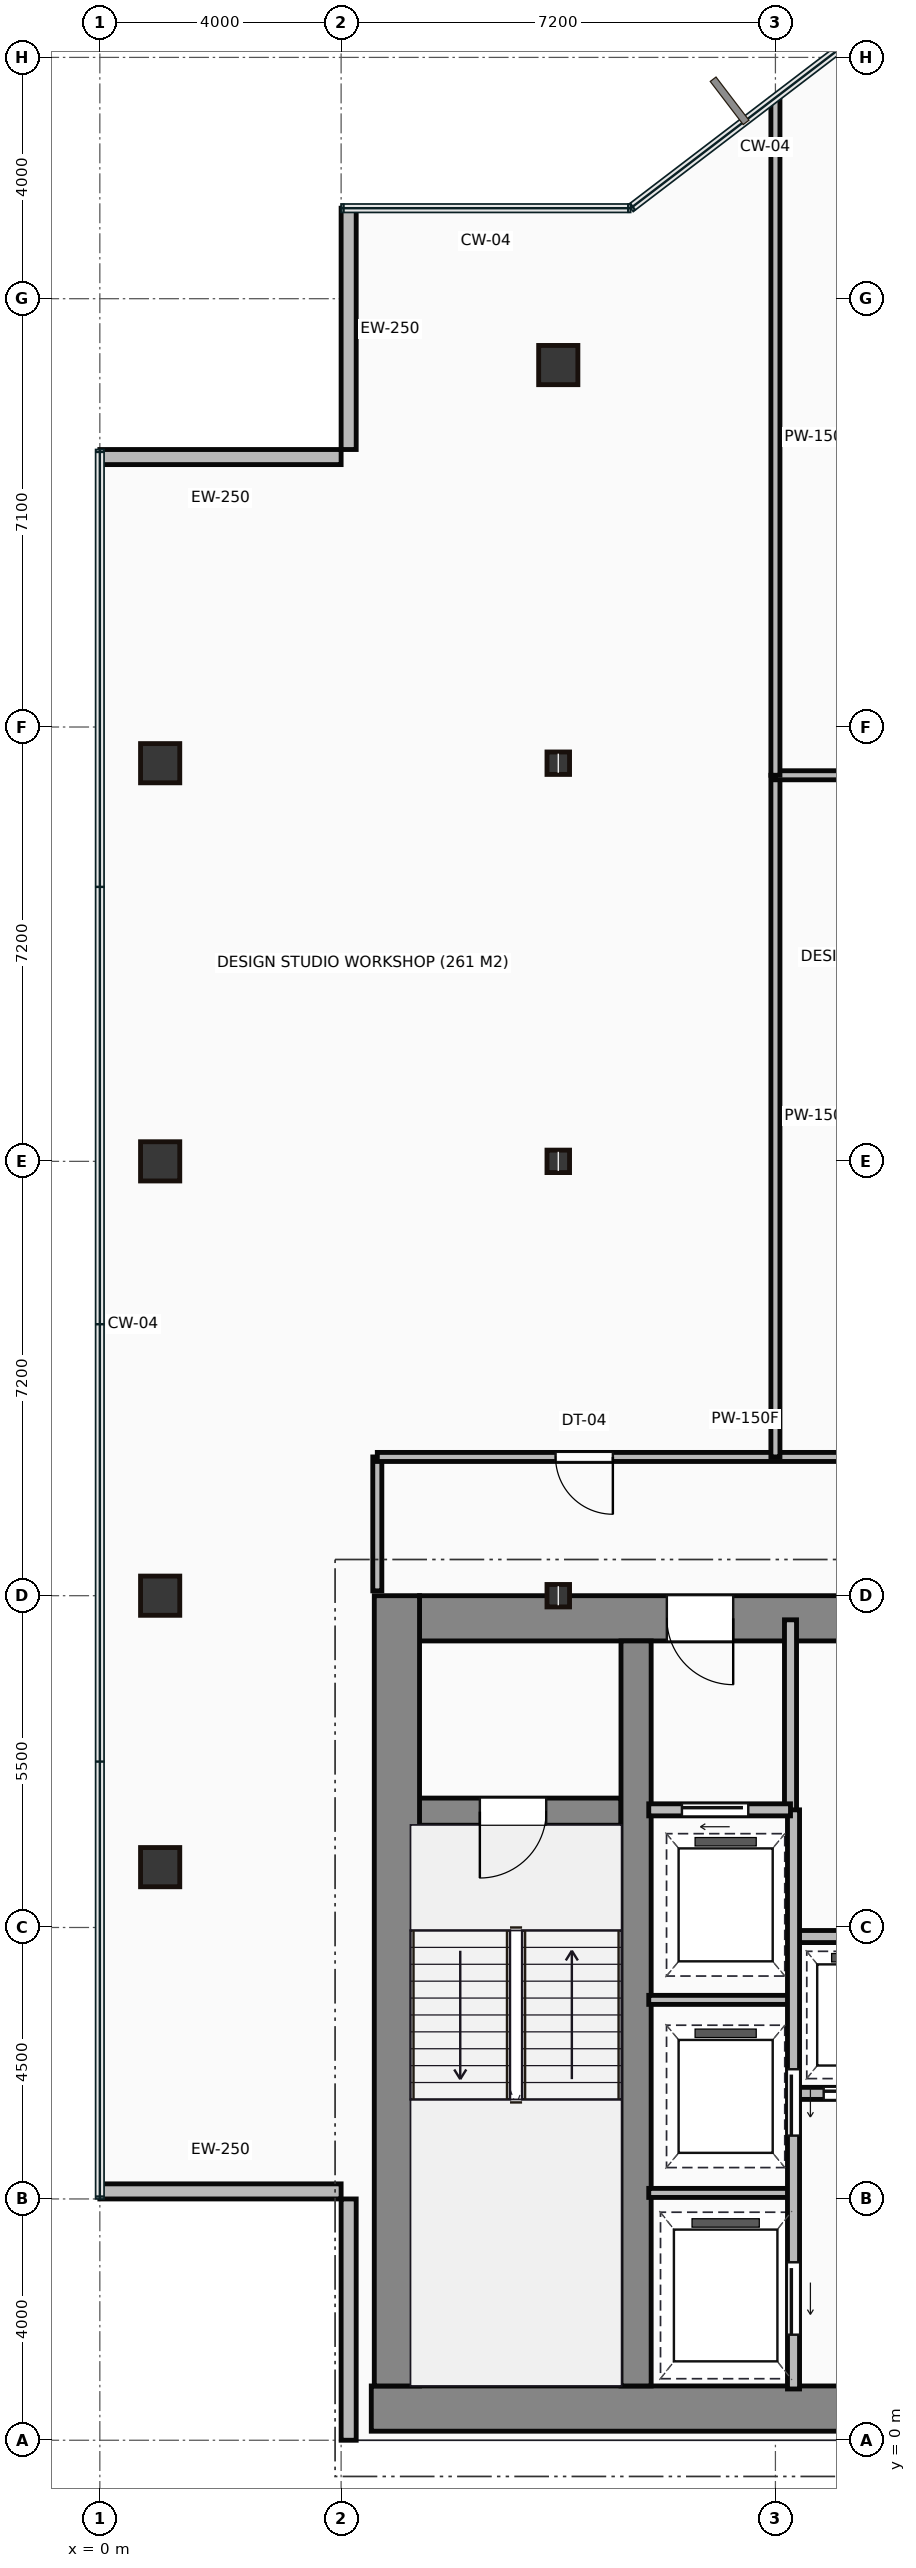
"""IFC4 building model, lengths in metres.
Left out: names, types, materials, properties, quantities, classifications, styles, units other than length and angle.
Written with IfcOpenShell. Run it as: python <this file> out.ifc"""

import sys

from ifc_helpers import new_model, si_unit, direction, frame, frame_2d, origin, origin_2d, place, context, subcontext, project, spatial, rectangle, hollow_rectangle, i_section, extrude, source, transform, mapped, element, fill, save


model = new_model("IFC4")
c1 = context("Model", 3, precision=1e-05, world=origin(), true_north=direction((0.0, 1.0)))
c2 = subcontext(c1, "Body", "Model", "MODEL_VIEW")
j1 = project(units=[si_unit("LENGTHUNIT", "METRE"), si_unit("PLANEANGLEUNIT", "RADIAN")], contexts=[c1])
p1 = place(None, origin())
s1 = spatial("IfcSite", under=j1, at=p1, CompositionType="ELEMENT")
p2 = place(p1, origin())
s2 = spatial("IfcBuilding", under=s1, at=p2, CompositionType="ELEMENT")
p3 = place(p2, frame((0.0, 0.0, 158.85)))
s3 = spatial("IfcBuildingStorey", under=s2, at=p3, CompositionType="ELEMENT", Elevation=158.85)
m1 = source(origin(), c2, "Body", "SweptSolid", [
    extrude(rectangle(XDim=29.5, YDim=0.75, at=frame_2d((14.75, 0.0))), origin(), (0.0, 0.0, 1.0), 3.65),
])
p4 = place(p3, frame((4.5, 0.525, 0.0), z_axis=(0.0, 0.0, 1.0), x_axis=(1.0, 0.0, 0.0)))
e1 = element("IfcWall", 1, at=p4, inside=s3, PredefinedType="SHEAR", context=c2, shape_type="MappedRepresentation", body=[
    mapped(m1, transform((0.0, 0.0, 0.0))),
])
m2 = source(origin(), c2, "Body", "SweptSolid", [
    extrude(rectangle(XDim=13.1, YDim=0.75, at=frame_2d((6.55, 0.0))), origin(), (0.0, 0.0, 1.0), 3.65),
])
p5 = place(p3, frame((4.925, 0.9, 0.0), z_axis=(0.0, 0.0, 1.0), x_axis=(0.0, 1.0, 0.0)))
e2 = element("IfcWall", 2, at=p5, inside=s3, PredefinedType="SHEAR", context=c2, shape_type="MappedRepresentation", body=[
    mapped(m2, transform((0.0, 0.0, 0.0))),
])
m3 = source(origin(), c2, "Body", "SweptSolid", [
    extrude(rectangle(XDim=9.1, YDim=0.75, at=frame_2d((4.55, 0.0))), origin(), (0.0, 0.0, 1.0), 3.65),
])
p6 = place(p3, frame((5.3, 13.625, 0.0), z_axis=(0.0, 0.0, 1.0), x_axis=(1.0, 0.0, 0.0)))
e3 = element("IfcWall", 3, at=p6, inside=s3, PredefinedType="SHEAR", context=c2, shape_type="MappedRepresentation", body=[
    mapped(m3, transform((0.0, 0.0, 0.0))),
])
p7 = place(p6, frame((4.1, 0.0, 0.0)))
e4 = element("IfcOpeningElement", 4, at=p7, cuts=e3, PredefinedType="OPENING", context=c2, shape_type="SweptSolid", body=[
    extrude(rectangle(XDim=1.1, YDim=2.15, at=frame_2d((0.55, 1.075))), frame((0.0, 0.385, 0.0), z_axis=(0.0, -1.0, 0.0), x_axis=(1.0, 0.0, 0.0)), (0.0, 0.0, 1.0), 0.77),
])
m4 = source(origin(), c2, "Body", "SweptSolid", [
    extrude(rectangle(XDim=12.35, YDim=0.5, at=frame_2d((6.175, 0.0))), origin(), (0.0, 0.0, 1.0), 3.65),
])
p8 = place(p3, frame((8.89, 0.9, 0.0), z_axis=(0.0, 0.0, 1.0), x_axis=(0.0, 1.0, 0.0)))
e5 = element("IfcWall", 5, at=p8, inside=s3, PredefinedType="SHEAR", context=c2, shape_type="MappedRepresentation", body=[
    mapped(m4, transform((0.0, 0.0, 0.0))),
])
m5 = source(origin(), c2, "Body", "SweptSolid", [
    extrude(rectangle(XDim=3.39, YDim=0.45, at=frame_2d((1.695, 0.0))), origin(), (0.0, 0.0, 1.0), 3.65),
])
p9 = place(p3, frame((5.25, 10.42, 0.0), z_axis=(0.0, 0.0, 1.0), x_axis=(1.0, 0.0, 0.0)))
e6 = element("IfcWall", 6, at=p9, inside=s3, PredefinedType="SHEAR", context=c2, shape_type="MappedRepresentation", body=[
    mapped(m5, transform((0.0, 0.0, 0.0))),
])
p10 = place(p9, frame((1.05, 0.0, 0.0)))
e7 = element("IfcOpeningElement", 7, at=p10, cuts=e6, PredefinedType="OPENING", context=c2, shape_type="SweptSolid", body=[
    extrude(rectangle(XDim=1.1, YDim=2.15, at=frame_2d((0.55, 1.075))), frame((0.0, 0.235, 0.0), z_axis=(0.0, -1.0, 0.0), x_axis=(1.0, 0.0, 0.0)), (0.0, 0.0, 1.0), 0.47),
])
m6 = source(origin(), c2, "Body", "SweptSolid", [
    extrude(hollow_rectangle(XDim=0.65, YDim=0.65, WallThickness=0.032, at=origin_2d()), origin(), (0.0, 0.0, 1.0), 3.65),
])
for number, where, z_axis, x_axis in (
    (8, (1.0, 9.5, 0.0), (0.0, 0.0, 1.0), (1.0, 0.0, 0.0)),
    (9, (1.0, 14.0, 0.0), (0.0, 0.0, 1.0), (1.0, 0.0, 0.0)),
    (10, (1.0, 21.2, 0.0), (0.0, 0.0, 1.0), (1.0, 0.0, 0.0)),
    (11, (1.0, 27.8, 0.0), (0.0, 0.0, 1.0), (1.0, 0.0, 0.0)),
):
    element("IfcColumn", number, at=place(p3, frame(where, z_axis=z_axis, x_axis=x_axis)), inside=s3, PredefinedType="COLUMN", context=c2, shape_type="MappedRepresentation", body=[
        mapped(m6, transform((0.0, 0.0, 0.0))),
    ])
m7 = source(origin(), c2, "Body", "SweptSolid", [
    extrude(i_section(OverallWidth=0.374, OverallDepth=0.372, WebThickness=0.016, FlangeThickness=0.026, at=origin_2d()), origin(), (0.0, 0.0, 1.0), 3.65),
])
for number, where, z_axis, x_axis in (
    (12, (7.6, 14.0, 0.0), (0.0, 0.0, 1.0), (1.0, 0.0, 0.0)),
    (13, (7.6, 21.2, 0.0), (0.0, 0.0, 1.0), (1.0, 0.0, 0.0)),
    (14, (7.6, 27.8, 0.0), (0.0, 0.0, 1.0), (1.0, 0.0, 0.0)),
):
    element("IfcColumn", number, at=place(p3, frame(where, z_axis=z_axis, x_axis=x_axis)), inside=s3, PredefinedType="COLUMN", context=c2, shape_type="MappedRepresentation", body=[
        mapped(m7, transform((0.0, 0.0, 0.0))),
    ])
p11 = place(p3, frame((7.6, 34.4, 0.0), z_axis=(0.0, 0.0, 1.0), x_axis=(1.0, 0.0, 0.0)))
e15 = element("IfcColumn", 15, at=p11, inside=s3, PredefinedType="COLUMN", context=c2, shape_type="MappedRepresentation", body=[
    mapped(m6, transform((0.0, 0.0, 0.0))),
])
m8 = source(origin(), c2, "Body", "SweptSolid", [
    extrude(rectangle(XDim=4.0, YDim=0.25, at=frame_2d((2.0, 0.0))), origin(), (0.0, 0.0, 1.0), 3.4),
])
for number, where, z_axis, x_axis in (
    (16, (4.125, 37.0, 0.0), (0.0, 0.0, 1.0), (0.0, -1.0, 0.0)),
    (17, (4.0, 32.875, 0.0), (0.0, 0.0, 1.0), (-1.0, 0.0, 0.0)),
    (18, (0.0, 4.125, 0.0), (0.0, 0.0, 1.0), (1.0, 0.0, 0.0)),
    (19, (4.125, 4.0, 0.0), (0.0, 0.0, 1.0), (0.0, -1.0, 0.0)),
):
    element("IfcWall", number, at=place(p3, frame(where, z_axis=z_axis, x_axis=x_axis)), inside=s3, PredefinedType="STANDARD", context=c2, shape_type="MappedRepresentation", body=[
        mapped(m8, transform((0.0, 0.0, 0.0))),
    ])
m9 = source(origin(), c2, "Body", "SweptSolid", [
    extrude(rectangle(XDim=3.18, YDim=0.2, at=frame_2d((1.59, 0.0))), origin(), (0.0, 0.0, 1.0), 3.4),
])
p12 = place(p3, frame((11.45, 10.42, 0.0), z_axis=(0.0, 0.0, 1.0), x_axis=(0.0, 1.0, 0.0)))
e20 = element("IfcWall", 20, at=p12, inside=s3, PredefinedType="PARTITIONING", context=c2, shape_type="MappedRepresentation", body=[
    mapped(m9, transform((0.0, 0.0, 0.0))),
])
m10 = source(origin(), c2, "Body", "SweptSolid", [
    extrude(rectangle(XDim=2.35, YDim=0.2, at=frame_2d((1.175, 0.0))), origin(), (0.0, 0.0, 1.0), 3.4),
])
p13 = place(p3, frame((9.1, 10.45, 0.0), z_axis=(0.0, 0.0, 1.0), x_axis=(1.0, 0.0, 0.0)))
e21 = element("IfcWall", 21, at=p13, inside=s3, PredefinedType="PARTITIONING", context=c2, shape_type="MappedRepresentation", body=[
    mapped(m10, transform((0.0, 0.0, 0.0))),
])
p14 = place(p13, frame((0.55, 0.0, 0.0)))
e22 = element("IfcOpeningElement", 22, at=p14, cuts=e21, PredefinedType="OPENING", context=c2, shape_type="SweptSolid", body=[
    extrude(rectangle(XDim=1.1, YDim=2.15, at=frame_2d((0.55, 1.075))), frame((0.0, 0.11, 0.0), z_axis=(0.0, -1.0, 0.0), x_axis=(1.0, 0.0, 0.0)), (0.0, 0.0, 1.0), 0.22),
])
m11 = source(origin(), c2, "Body", "SweptSolid", [
    extrude(rectangle(XDim=9.6, YDim=0.2, at=frame_2d((4.8, 0.0))), origin(), (0.0, 0.0, 1.0), 3.4),
])
p15 = place(p3, frame((11.5, 0.85, 0.0), z_axis=(0.0, 0.0, 1.0), x_axis=(0.0, 1.0, 0.0)))
e23 = element("IfcWall", 23, at=p15, inside=s3, PredefinedType="PARTITIONING", context=c2, shape_type="MappedRepresentation", body=[
    mapped(m11, transform((0.0, 0.0, 0.0))),
])
p16 = place(p15, frame((4.2, 0.0, 0.0)))
e24 = element("IfcOpeningElement", 24, at=p16, cuts=e23, PredefinedType="OPENING", context=c2, shape_type="SweptSolid", body=[
    extrude(rectangle(XDim=1.1, YDim=2.15, at=frame_2d((0.55, 1.075))), frame((0.0, 0.11, 0.0), z_axis=(0.0, -1.0, 0.0), x_axis=(1.0, 0.0, 0.0)), (0.0, 0.0, 1.0), 0.22),
])
p17 = place(p15, frame((0.9, 0.0, 0.0)))
e25 = element("IfcOpeningElement", 25, at=p17, cuts=e23, PredefinedType="OPENING", context=c2, shape_type="SweptSolid", body=[
    extrude(rectangle(XDim=1.2, YDim=2.15, at=frame_2d((0.6, 1.075))), frame((0.0, 0.11, 0.0), z_axis=(0.0, -1.0, 0.0), x_axis=(1.0, 0.0, 0.0)), (0.0, 0.0, 1.0), 0.22),
])
m12 = source(origin(), c2, "Body", "SweptSolid", [
    extrude(rectangle(XDim=2.4, YDim=0.15, at=frame_2d((1.2, 0.0))), origin(), (0.0, 0.0, 1.0), 3.4),
])
for number, where, z_axis, x_axis in (
    (26, (9.1, 4.1, 0.0), (0.0, 0.0, 1.0), (1.0, 0.0, 0.0)),
    (27, (9.1, 7.3, 0.0), (0.0, 0.0, 1.0), (1.0, 0.0, 0.0)),
):
    element("IfcWall", number, at=place(p3, frame(where, z_axis=z_axis, x_axis=x_axis)), inside=s3, PredefinedType="PARTITIONING", context=c2, shape_type="MappedRepresentation", body=[
        mapped(m12, transform((0.0, 0.0, 0.0))),
    ])
m13 = source(origin(), c2, "Body", "SweptSolid", [
    extrude(rectangle(XDim=11.85, YDim=0.2, at=frame_2d((5.925, 0.0))), origin(), (0.0, 0.0, 1.0), 3.4),
])
p18 = place(p3, frame((11.55, 5.75, 0.0), z_axis=(0.0, 0.0, 1.0), x_axis=(1.0, 0.0, 0.0)))
e28 = element("IfcWall", 28, at=p18, inside=s3, PredefinedType="PARTITIONING", context=c2, shape_type="MappedRepresentation", body=[
    mapped(m13, transform((0.0, 0.0, 0.0))),
])
p19 = place(p18, frame((0.45, 0.0, 0.0)))
e29 = element("IfcOpeningElement", 29, at=p19, cuts=e28, PredefinedType="OPENING", context=c2, shape_type="SweptSolid", body=[
    extrude(rectangle(XDim=1.05, YDim=2.15, at=frame_2d((0.525, 1.075))), frame((0.0, 0.11, 0.0), z_axis=(0.0, -1.0, 0.0), x_axis=(1.0, 0.0, 0.0)), (0.0, 0.0, 1.0), 0.22),
])
p20 = place(p18, frame((2.4, 0.0, 0.0)))
e30 = element("IfcOpeningElement", 30, at=p20, cuts=e28, PredefinedType="OPENING", context=c2, shape_type="SweptSolid", body=[
    extrude(rectangle(XDim=1.05, YDim=2.15, at=frame_2d((0.525, 1.075))), frame((0.0, 0.11, 0.0), z_axis=(0.0, -1.0, 0.0), x_axis=(1.0, 0.0, 0.0)), (0.0, 0.0, 1.0), 0.22),
])
p21 = place(p18, frame((4.35, 0.0, 0.0)))
e31 = element("IfcOpeningElement", 31, at=p21, cuts=e28, PredefinedType="OPENING", context=c2, shape_type="SweptSolid", body=[
    extrude(rectangle(XDim=1.05, YDim=2.15, at=frame_2d((0.525, 1.075))), frame((0.0, 0.11, 0.0), z_axis=(0.0, -1.0, 0.0), x_axis=(1.0, 0.0, 0.0)), (0.0, 0.0, 1.0), 0.22),
])
p22 = place(p18, frame((6.3, 0.0, 0.0)))
e32 = element("IfcOpeningElement", 32, at=p22, cuts=e28, PredefinedType="OPENING", context=c2, shape_type="SweptSolid", body=[
    extrude(rectangle(XDim=1.05, YDim=2.15, at=frame_2d((0.525, 1.075))), frame((0.0, 0.11, 0.0), z_axis=(0.0, -1.0, 0.0), x_axis=(1.0, 0.0, 0.0)), (0.0, 0.0, 1.0), 0.22),
])
p23 = place(p18, frame((8.25, 0.0, 0.0)))
e33 = element("IfcOpeningElement", 33, at=p23, cuts=e28, PredefinedType="OPENING", context=c2, shape_type="SweptSolid", body=[
    extrude(rectangle(XDim=1.05, YDim=2.15, at=frame_2d((0.525, 1.075))), frame((0.0, 0.11, 0.0), z_axis=(0.0, -1.0, 0.0), x_axis=(1.0, 0.0, 0.0)), (0.0, 0.0, 1.0), 0.22),
])
p24 = place(p18, frame((10.2, 0.0, 0.0)))
e34 = element("IfcOpeningElement", 34, at=p24, cuts=e28, PredefinedType="OPENING", context=c2, shape_type="SweptSolid", body=[
    extrude(rectangle(XDim=1.05, YDim=2.15, at=frame_2d((0.525, 1.075))), frame((0.0, 0.11, 0.0), z_axis=(0.0, -1.0, 0.0), x_axis=(1.0, 0.0, 0.0)), (0.0, 0.0, 1.0), 0.22),
])
p25 = place(p3, frame((11.55, 8.35, 0.0), z_axis=(0.0, 0.0, 1.0), x_axis=(1.0, 0.0, 0.0)))
e35 = element("IfcWall", 35, at=p25, inside=s3, PredefinedType="PARTITIONING", context=c2, shape_type="MappedRepresentation", body=[
    mapped(m13, transform((0.0, 0.0, 0.0))),
])
m14 = source(origin(), c2, "Body", "SweptSolid", [
    extrude(rectangle(XDim=2.22, YDim=0.15, at=frame_2d((1.11, 0.0))), origin(), (0.0, 0.0, 1.0), 3.4),
])
p26 = place(p3, frame((4.6, 14.08, 0.0), z_axis=(0.0, 0.0, 1.0), x_axis=(0.0, 1.0, 0.0)))
e36 = element("IfcWall", 36, at=p26, inside=s3, PredefinedType="PARTITIONING", context=c2, shape_type="MappedRepresentation", body=[
    mapped(m14, transform((0.0, 0.0, 0.0))),
])
m15 = source(origin(), c2, "Body", "SweptSolid", [
    extrude(rectangle(XDim=12.2, YDim=0.15, at=frame_2d((6.1, 0.0))), origin(), (0.0, 0.0, 1.0), 3.4),
])
p27 = place(p3, frame((4.6, 16.3, 0.0), z_axis=(0.0, 0.0, 1.0), x_axis=(1.0, 0.0, 0.0)))
e37 = element("IfcWall", 37, at=p27, inside=s3, PredefinedType="PARTITIONING", context=c2, shape_type="MappedRepresentation", body=[
    mapped(m15, transform((0.0, 0.0, 0.0))),
])
p28 = place(p27, frame((2.955, 0.0, 0.0)))
e38 = element("IfcOpeningElement", 38, at=p28, cuts=e37, PredefinedType="OPENING", context=c2, shape_type="SweptSolid", body=[
    extrude(rectangle(XDim=0.95, YDim=2.15, at=frame_2d((0.475, 1.075))), frame((0.0, 0.085, 0.0), z_axis=(0.0, -1.0, 0.0), x_axis=(1.0, 0.0, 0.0)), (0.0, 0.0, 1.0), 0.17),
])
m16 = source(origin(), c2, "Body", "SweptSolid", [
    extrude(rectangle(XDim=11.3, YDim=0.15, at=frame_2d((5.65, 0.0))), origin(), (0.0, 0.0, 1.0), 3.4),
])
p29 = place(p3, frame((11.2, 27.6, 0.0), z_axis=(0.0, 0.0, 1.0), x_axis=(0.0, -1.0, 0.0)))
e39 = element("IfcWall", 39, at=p29, inside=s3, PredefinedType="PARTITIONING", context=c2, shape_type="MappedRepresentation", body=[
    mapped(m16, transform((0.0, 0.0, 0.0))),
])
m17 = source(origin(), c2, "Body", "SweptSolid", [
    extrude(rectangle(XDim=5.6, YDim=0.15, at=frame_2d((2.8, 0.0))), origin(), (0.0, 0.0, 1.0), 3.4),
])
p30 = place(p3, frame((11.2, 27.6, 0.0), z_axis=(0.0, 0.0, 1.0), x_axis=(1.0, 0.0, 0.0)))
e40 = element("IfcWall", 40, at=p30, inside=s3, PredefinedType="PARTITIONING", context=c2, shape_type="MappedRepresentation", body=[
    mapped(m17, transform((0.0, 0.0, 0.0))),
])
m18 = source(origin(), c2, "Body", "SweptSolid", [
    extrude(rectangle(XDim=11.206, YDim=0.15, at=frame_2d((5.603, 0.0))), origin(), (0.0, 0.0, 1.0), 3.4),
])
p31 = place(p3, frame((11.2, 38.806, 0.0), z_axis=(0.0, 0.0, 1.0), x_axis=(0.0, -1.0, 0.0)))
e41 = element("IfcWall", 41, at=p31, inside=s3, PredefinedType="PARTITIONING", context=c2, shape_type="MappedRepresentation", body=[
    mapped(m18, transform((0.0, 0.0, 0.0))),
])
m19 = source(origin(), c2, "Body", "SweptSolid", [
    extrude(rectangle(XDim=1.1, YDim=2.15, at=frame_2d((0.55, 1.075))), frame((0.0, 0.025, 0.0), z_axis=(0.0, -1.0, 0.0), x_axis=(1.0, 0.0, 0.0)), (0.0, 0.0, 1.0), 0.05),
])
p32 = place(p10, frame((1.1, 0.0, 0.0), z_axis=(0.0, 0.0, 1.0), x_axis=(-1.0, 0.0, 0.0)))
e42 = element("IfcDoor", 42, at=p32, inside=s3, OperationType="SINGLE_SWING_LEFT", PredefinedType="DOOR", context=c2, shape_type="MappedRepresentation", body=[
    mapped(m19, transform((0.0, 0.0, 0.0))),
])
fill(e7, e42)
p33 = place(p7, origin())
e43 = element("IfcDoor", 43, at=p33, inside=s3, OperationType="SINGLE_SWING_RIGHT", PredefinedType="DOOR", context=c2, shape_type="MappedRepresentation", body=[
    mapped(m19, transform((0.0, 0.0, 0.0))),
])
fill(e4, e43)
p34 = place(p14, origin())
e44 = element("IfcDoor", 44, at=p34, inside=s3, OperationType="SLIDING_TO_LEFT", PredefinedType="DOOR", context=c2, shape_type="MappedRepresentation", body=[
    mapped(m19, transform((0.0, 0.0, 0.0))),
])
fill(e22, e44)
p35 = place(p16, frame((1.1, 0.0, 0.0), z_axis=(0.0, 0.0, 1.0), x_axis=(-1.0, 0.0, 0.0)))
e45 = element("IfcDoor", 45, at=p35, inside=s3, OperationType="SLIDING_TO_LEFT", PredefinedType="DOOR", context=c2, shape_type="MappedRepresentation", body=[
    mapped(m19, transform((0.0, 0.0, 0.0))),
])
fill(e24, e45)
m20 = source(origin(), c2, "Body", "SweptSolid", [
    extrude(rectangle(XDim=1.2, YDim=2.15, at=frame_2d((0.6, 1.075))), frame((0.0, 0.025, 0.0), z_axis=(0.0, -1.0, 0.0), x_axis=(1.0, 0.0, 0.0)), (0.0, 0.0, 1.0), 0.05),
])
p36 = place(p17, frame((1.2, 0.0, 0.0), z_axis=(0.0, 0.0, 1.0), x_axis=(-1.0, 0.0, 0.0)))
e46 = element("IfcDoor", 46, at=p36, inside=s3, OperationType="SLIDING_TO_LEFT", PredefinedType="DOOR", context=c2, shape_type="MappedRepresentation", body=[
    mapped(m20, transform((0.0, 0.0, 0.0))),
])
fill(e25, e46)
m21 = source(origin(), c2, "Body", "SweptSolid", [
    extrude(rectangle(XDim=1.05, YDim=2.15, at=frame_2d((0.525, 1.075))), frame((0.0, 0.025, 0.0), z_axis=(0.0, -1.0, 0.0), x_axis=(1.0, 0.0, 0.0)), (0.0, 0.0, 1.0), 0.05),
])
p37 = place(p19, frame((1.05, 0.0, 0.0), z_axis=(0.0, 0.0, 1.0), x_axis=(-1.0, 0.0, 0.0)))
e47 = element("IfcDoor", 47, at=p37, inside=s3, OperationType="SLIDING_TO_LEFT", PredefinedType="DOOR", context=c2, shape_type="MappedRepresentation", body=[
    mapped(m21, transform((0.0, 0.0, 0.0))),
])
fill(e29, e47)
m22 = source(origin(), c2, "Body", "SweptSolid", [
    extrude(rectangle(XDim=0.95, YDim=2.15, at=frame_2d((0.475, 1.075))), frame((0.0, 0.025, 0.0), z_axis=(0.0, -1.0, 0.0), x_axis=(1.0, 0.0, 0.0)), (0.0, 0.0, 1.0), 0.05),
])
p38 = place(p28, origin())
e48 = element("IfcDoor", 48, at=p38, inside=s3, OperationType="SINGLE_SWING_RIGHT", PredefinedType="DOOR", context=c2, shape_type="MappedRepresentation", body=[
    mapped(m22, transform((0.0, 0.0, 0.0))),
])
fill(e38, e48)
save(model, sys.argv[1])
